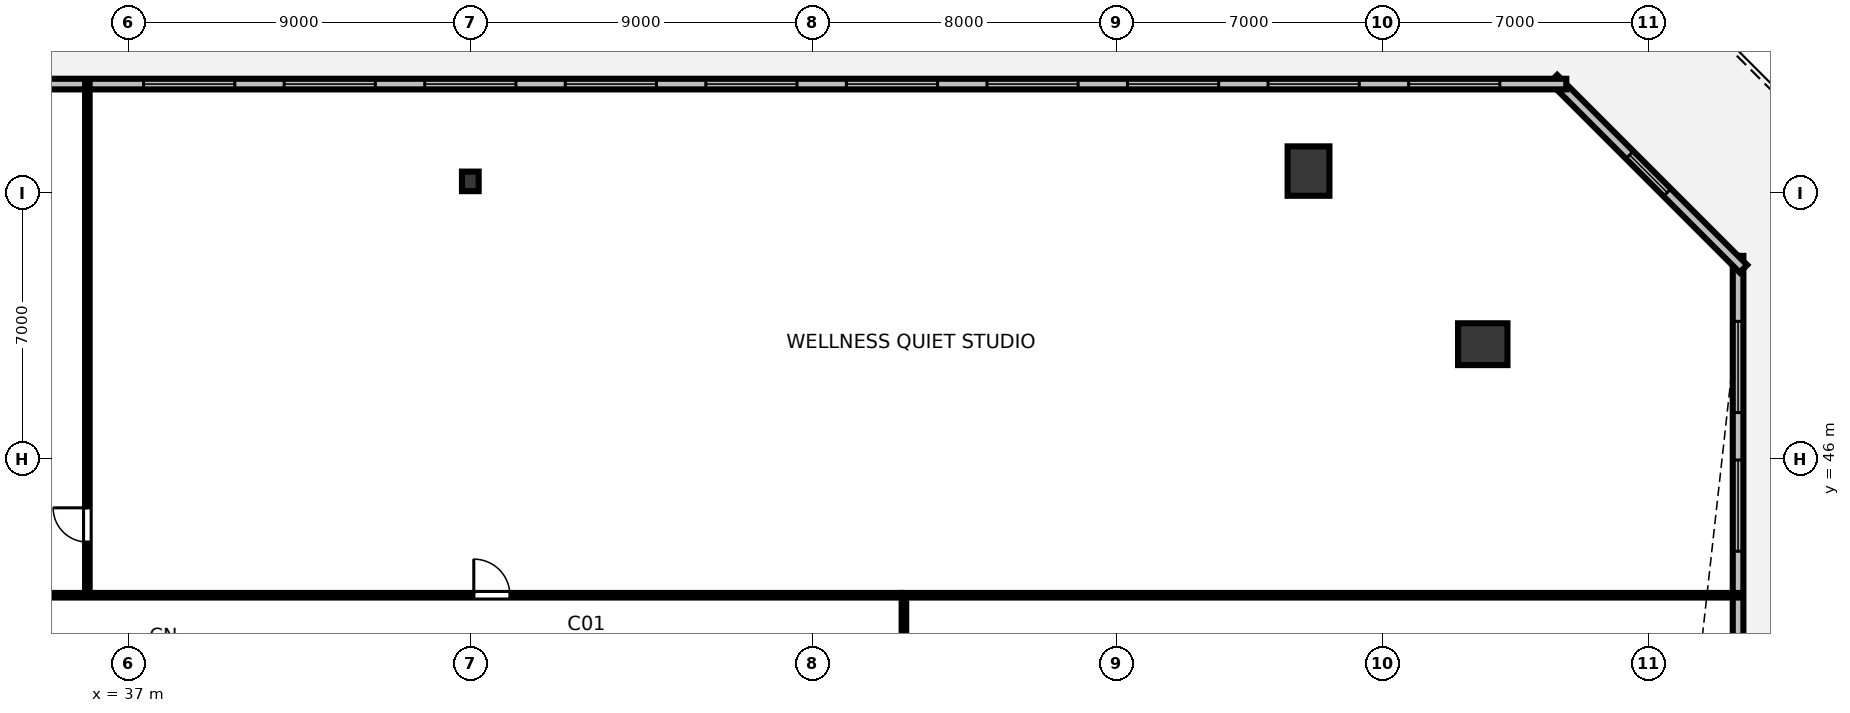
"""IFC4 building model, lengths in metres.
Left out: names, types, materials, properties, quantities, classifications, styles, units other than length and angle.
Written with IfcOpenShell. Run it as: python <this file> out.ifc"""

import sys

from ifc_helpers import new_model, si_unit, direction, frame, frame_2d, origin, origin_2d, place, context, subcontext, project, spatial, rectangle, hollow_rectangle, i_section, extrude, element, fill, save


model = new_model("IFC4")
c1 = context("Model", 3, precision=1e-05, world=origin(), true_north=direction((0.0, 1.0)))
c2 = subcontext(c1, "Body", "Model", "MODEL_VIEW")
j1 = project(units=[si_unit("LENGTHUNIT", "METRE"), si_unit("PLANEANGLEUNIT", "RADIAN")], contexts=[c1])
p1 = place(None, origin())
s1 = spatial("IfcSite", under=j1, at=p1, CompositionType="ELEMENT")
p2 = place(p1, origin())
s2 = spatial("IfcBuilding", under=s1, at=p2, CompositionType="ELEMENT")
p3 = place(p2, frame((0.0, 0.0, 14.0)))
s3 = spatial("IfcBuildingStorey", under=s2, at=p3, CompositionType="ELEMENT", Elevation=14.0)
for number, where, z_axis, x_axis in (
    (1, (72.642, 49.016, 0.0), (0.0, 0.0, 1.0), (0.0, 1.0, 0.0)),
    (2, (68.057, 53.571, 0.0), (0.0, 0.0, 1.0), (1.0, 0.0, 0.0)),
):
    element("IfcColumn", number, at=place(p3, frame(where, z_axis=z_axis, x_axis=x_axis)), inside=s3, PredefinedType="COLUMN", context=c2, shape_type="SweptSolid", body=[
        extrude(hollow_rectangle(XDim=1.1, YDim=1.3, WallThickness=0.07, at=origin_2d()), origin(), (0.0, 0.0, 1.0), 4.208),
    ])
p4 = place(p3, frame((46.0, 53.3, 0.0), z_axis=(0.0, 0.0, 1.0), x_axis=(1.0, 0.0, 0.0)))
e3 = element("IfcColumn", 3, at=p4, inside=s3, PredefinedType="COLUMN", context=c2, shape_type="SweptSolid", body=[
    extrude(i_section(OverallWidth=0.439, OverallDepth=0.514, WebThickness=0.06, FlangeThickness=0.097, FilletRadius=0.025, at=origin_2d()), origin(), (0.0, 0.0, 1.0), 4.208),
])
p5 = place(p3, frame((79.36, 12.66, 0.0), z_axis=(0.0, 0.0, 1.0), x_axis=(0.0, 1.0, 0.0)))
e4 = element("IfcWall", 4, at=p5, inside=s3, PredefinedType="STANDARD", context=c2, shape_type="SweptSolid", body=[
    extrude(rectangle(XDim=38.68, YDim=0.28, at=frame_2d((19.34, 0.0))), origin(), (0.0, 0.0, 1.0), 4.21),
])
p6 = place(p5, frame((23.74, 0.0, 0.0)))
e5 = element("IfcOpeningElement", 5, at=p6, cuts=e4, PredefinedType="OPENING", context=c2, shape_type="SweptSolid", body=[
    extrude(rectangle(XDim=1.6, YDim=2.15, at=frame_2d((0.8, 1.075))), frame((0.0, 0.15, 0.0), z_axis=(0.0, -1.0, 0.0), x_axis=(1.0, 0.0, 0.0)), (0.0, 0.0, 1.0), 0.3),
])
p7 = place(p5, frame((1.724, 0.0, 0.85)))
e6 = element("IfcOpeningElement", 6, at=p7, cuts=e4, PredefinedType="OPENING", context=c2, shape_type="SweptSolid", body=[
    extrude(rectangle(XDim=2.4, YDim=2.4, at=frame_2d((1.2, 1.2))), frame((0.0, 0.15, 0.0), z_axis=(0.0, -1.0, 0.0), x_axis=(1.0, 0.0, 0.0)), (0.0, 0.0, 1.0), 0.3),
])
p8 = place(p5, frame((5.372, 0.0, 0.85)))
e7 = element("IfcOpeningElement", 7, at=p8, cuts=e4, PredefinedType="OPENING", context=c2, shape_type="SweptSolid", body=[
    extrude(rectangle(XDim=2.4, YDim=2.4, at=frame_2d((1.2, 1.2))), frame((0.0, 0.15, 0.0), z_axis=(0.0, -1.0, 0.0), x_axis=(1.0, 0.0, 0.0)), (0.0, 0.0, 1.0), 0.3),
])
p9 = place(p5, frame((16.316, 0.0, 0.85)))
e8 = element("IfcOpeningElement", 8, at=p9, cuts=e4, PredefinedType="OPENING", context=c2, shape_type="SweptSolid", body=[
    extrude(rectangle(XDim=2.4, YDim=2.4, at=frame_2d((1.2, 1.2))), frame((0.0, 0.15, 0.0), z_axis=(0.0, -1.0, 0.0), x_axis=(1.0, 0.0, 0.0)), (0.0, 0.0, 1.0), 0.3),
])
p10 = place(p5, frame((19.964, 0.0, 0.85)))
e9 = element("IfcOpeningElement", 9, at=p10, cuts=e4, PredefinedType="OPENING", context=c2, shape_type="SweptSolid", body=[
    extrude(rectangle(XDim=2.4, YDim=2.4, at=frame_2d((1.2, 1.2))), frame((0.0, 0.15, 0.0), z_axis=(0.0, -1.0, 0.0), x_axis=(1.0, 0.0, 0.0)), (0.0, 0.0, 1.0), 0.3),
])
p11 = place(p5, frame((30.908, 0.0, 0.85)))
e10 = element("IfcOpeningElement", 10, at=p11, cuts=e4, PredefinedType="OPENING", context=c2, shape_type="SweptSolid", body=[
    extrude(rectangle(XDim=2.4, YDim=2.4, at=frame_2d((1.2, 1.2))), frame((0.0, 0.15, 0.0), z_axis=(0.0, -1.0, 0.0), x_axis=(1.0, 0.0, 0.0)), (0.0, 0.0, 1.0), 0.3),
])
p12 = place(p5, frame((34.556, 0.0, 0.85)))
e11 = element("IfcOpeningElement", 11, at=p12, cuts=e4, PredefinedType="OPENING", context=c2, shape_type="SweptSolid", body=[
    extrude(rectangle(XDim=2.4, YDim=2.4, at=frame_2d((1.2, 1.2))), frame((0.0, 0.15, 0.0), z_axis=(0.0, -1.0, 0.0), x_axis=(1.0, 0.0, 0.0)), (0.0, 0.0, 1.0), 0.3),
])
p13 = place(p3, frame((79.5, 51.002, 0.0), z_axis=(0.0, 0.0, 1.0), x_axis=(-0.707106781187, 0.707106781187, 0.0)))
e12 = element("IfcWall", 12, at=p13, inside=s3, PredefinedType="STANDARD", context=c2, shape_type="SweptSolid", body=[
    extrude(rectangle(XDim=7.068, YDim=0.28, at=frame_2d((3.534, 0.0))), origin(), (0.0, 0.0, 1.0), 4.21),
])
p14 = place(p13, frame((2.834, 0.0, 1.5)))
e13 = element("IfcOpeningElement", 13, at=p14, cuts=e12, PredefinedType="OPENING", context=c2, shape_type="SweptSolid", body=[
    extrude(rectangle(XDim=1.4, YDim=1.2, at=frame_2d((0.7, 0.6))), frame((0.0, 0.15, 0.0), z_axis=(0.0, -1.0, 0.0), x_axis=(1.0, 0.0, 0.0)), (0.0, 0.0, 1.0), 0.3),
])
p15 = place(p3, frame((74.84, 55.86, 0.0), z_axis=(0.0, 0.0, 1.0), x_axis=(-1.0, 0.0, 0.0)))
e14 = element("IfcWall", 14, at=p15, inside=s3, PredefinedType="STANDARD", context=c2, shape_type="SweptSolid", body=[
    extrude(rectangle(XDim=57.68, YDim=0.28, at=frame_2d((28.84, 0.0))), origin(), (0.0, 0.0, 1.0), 4.21),
])
p16 = place(p15, frame((1.749, 0.0, 0.85)))
e15 = element("IfcOpeningElement", 15, at=p16, cuts=e14, PredefinedType="OPENING", context=c2, shape_type="SweptSolid", body=[
    extrude(rectangle(XDim=2.4, YDim=2.4, at=frame_2d((1.2, 1.2))), frame((0.0, 0.15, 0.0), z_axis=(0.0, -1.0, 0.0), x_axis=(1.0, 0.0, 0.0)), (0.0, 0.0, 1.0), 0.3),
])
p17 = place(p15, frame((5.448, 0.0, 0.85)))
e16 = element("IfcOpeningElement", 16, at=p17, cuts=e14, PredefinedType="OPENING", context=c2, shape_type="SweptSolid", body=[
    extrude(rectangle(XDim=2.4, YDim=2.4, at=frame_2d((1.2, 1.2))), frame((0.0, 0.15, 0.0), z_axis=(0.0, -1.0, 0.0), x_axis=(1.0, 0.0, 0.0)), (0.0, 0.0, 1.0), 0.3),
])
p18 = place(p15, frame((9.147, 0.0, 0.85)))
e17 = element("IfcOpeningElement", 17, at=p18, cuts=e14, PredefinedType="OPENING", context=c2, shape_type="SweptSolid", body=[
    extrude(rectangle(XDim=2.4, YDim=2.4, at=frame_2d((1.2, 1.2))), frame((0.0, 0.15, 0.0), z_axis=(0.0, -1.0, 0.0), x_axis=(1.0, 0.0, 0.0)), (0.0, 0.0, 1.0), 0.3),
])
p19 = place(p15, frame((12.845, 0.0, 0.85)))
e18 = element("IfcOpeningElement", 18, at=p19, cuts=e14, PredefinedType="OPENING", context=c2, shape_type="SweptSolid", body=[
    extrude(rectangle(XDim=2.4, YDim=2.4, at=frame_2d((1.2, 1.2))), frame((0.0, 0.15, 0.0), z_axis=(0.0, -1.0, 0.0), x_axis=(1.0, 0.0, 0.0)), (0.0, 0.0, 1.0), 0.3),
])
p20 = place(p15, frame((16.544, 0.0, 0.85)))
e19 = element("IfcOpeningElement", 19, at=p20, cuts=e14, PredefinedType="OPENING", context=c2, shape_type="SweptSolid", body=[
    extrude(rectangle(XDim=2.4, YDim=2.4, at=frame_2d((1.2, 1.2))), frame((0.0, 0.15, 0.0), z_axis=(0.0, -1.0, 0.0), x_axis=(1.0, 0.0, 0.0)), (0.0, 0.0, 1.0), 0.3),
])
p21 = place(p15, frame((20.243, 0.0, 0.85)))
e20 = element("IfcOpeningElement", 20, at=p21, cuts=e14, PredefinedType="OPENING", context=c2, shape_type="SweptSolid", body=[
    extrude(rectangle(XDim=2.4, YDim=2.4, at=frame_2d((1.2, 1.2))), frame((0.0, 0.15, 0.0), z_axis=(0.0, -1.0, 0.0), x_axis=(1.0, 0.0, 0.0)), (0.0, 0.0, 1.0), 0.3),
])
p22 = place(p15, frame((23.941, 0.0, 0.85)))
e21 = element("IfcOpeningElement", 21, at=p22, cuts=e14, PredefinedType="OPENING", context=c2, shape_type="SweptSolid", body=[
    extrude(rectangle(XDim=2.4, YDim=2.4, at=frame_2d((1.2, 1.2))), frame((0.0, 0.15, 0.0), z_axis=(0.0, -1.0, 0.0), x_axis=(1.0, 0.0, 0.0)), (0.0, 0.0, 1.0), 0.3),
])
p23 = place(p15, frame((27.64, 0.0, 0.85)))
e22 = element("IfcOpeningElement", 22, at=p23, cuts=e14, PredefinedType="OPENING", context=c2, shape_type="SweptSolid", body=[
    extrude(rectangle(XDim=2.4, YDim=2.4, at=frame_2d((1.2, 1.2))), frame((0.0, 0.15, 0.0), z_axis=(0.0, -1.0, 0.0), x_axis=(1.0, 0.0, 0.0)), (0.0, 0.0, 1.0), 0.3),
])
p24 = place(p15, frame((31.339, 0.0, 0.85)))
e23 = element("IfcOpeningElement", 23, at=p24, cuts=e14, PredefinedType="OPENING", context=c2, shape_type="SweptSolid", body=[
    extrude(rectangle(XDim=2.4, YDim=2.4, at=frame_2d((1.2, 1.2))), frame((0.0, 0.15, 0.0), z_axis=(0.0, -1.0, 0.0), x_axis=(1.0, 0.0, 0.0)), (0.0, 0.0, 1.0), 0.3),
])
p25 = place(p15, frame((35.037, 0.0, 0.85)))
e24 = element("IfcOpeningElement", 24, at=p25, cuts=e14, PredefinedType="OPENING", context=c2, shape_type="SweptSolid", body=[
    extrude(rectangle(XDim=2.4, YDim=2.4, at=frame_2d((1.2, 1.2))), frame((0.0, 0.15, 0.0), z_axis=(0.0, -1.0, 0.0), x_axis=(1.0, 0.0, 0.0)), (0.0, 0.0, 1.0), 0.3),
])
p26 = place(p15, frame((42.435, 0.0, 0.85)))
e25 = element("IfcOpeningElement", 25, at=p26, cuts=e14, PredefinedType="OPENING", context=c2, shape_type="SweptSolid", body=[
    extrude(rectangle(XDim=2.4, YDim=2.4, at=frame_2d((1.2, 1.2))), frame((0.0, 0.15, 0.0), z_axis=(0.0, -1.0, 0.0), x_axis=(1.0, 0.0, 0.0)), (0.0, 0.0, 1.0), 0.3),
])
p27 = place(p15, frame((46.133, 0.0, 0.85)))
e26 = element("IfcOpeningElement", 26, at=p27, cuts=e14, PredefinedType="OPENING", context=c2, shape_type="SweptSolid", body=[
    extrude(rectangle(XDim=2.4, YDim=2.4, at=frame_2d((1.2, 1.2))), frame((0.0, 0.15, 0.0), z_axis=(0.0, -1.0, 0.0), x_axis=(1.0, 0.0, 0.0)), (0.0, 0.0, 1.0), 0.3),
])
p28 = place(p15, frame((49.832, 0.0, 0.85)))
e27 = element("IfcOpeningElement", 27, at=p28, cuts=e14, PredefinedType="OPENING", context=c2, shape_type="SweptSolid", body=[
    extrude(rectangle(XDim=2.4, YDim=2.4, at=frame_2d((1.2, 1.2))), frame((0.0, 0.15, 0.0), z_axis=(0.0, -1.0, 0.0), x_axis=(1.0, 0.0, 0.0)), (0.0, 0.0, 1.0), 0.3),
])
p29 = place(p15, frame((53.531, 0.0, 0.85)))
e28 = element("IfcOpeningElement", 28, at=p29, cuts=e14, PredefinedType="OPENING", context=c2, shape_type="SweptSolid", body=[
    extrude(rectangle(XDim=2.4, YDim=2.4, at=frame_2d((1.2, 1.2))), frame((0.0, 0.15, 0.0), z_axis=(0.0, -1.0, 0.0), x_axis=(1.0, 0.0, 0.0)), (0.0, 0.0, 1.0), 0.3),
])
p30 = place(p3, frame((35.923, 42.41, 0.0), z_axis=(0.0, 0.0, 1.0), x_axis=(0.0, 1.0, 0.0)))
e29 = element("IfcWall", 29, at=p30, inside=s3, PredefinedType="PARTITIONING", context=c2, shape_type="SweptSolid", body=[
    extrude(rectangle(XDim=13.45, YDim=0.12, at=frame_2d((6.725, 0.0))), origin(), (0.0, 0.0, 1.0), 3.31),
])
p31 = place(p30, frame((1.4, 0.0, 0.0)))
e30 = element("IfcOpeningElement", 30, at=p31, cuts=e29, PredefinedType="OPENING", context=c2, shape_type="SweptSolid", body=[
    extrude(rectangle(XDim=0.9, YDim=2.15, at=frame_2d((0.45, 1.075))), frame((0.0, 0.07, 0.0), z_axis=(0.0, -1.0, 0.0), x_axis=(1.0, 0.0, 0.0)), (0.0, 0.0, 1.0), 0.14),
])
p32 = place(p3, frame((34.65, 42.41, 0.0), z_axis=(0.0, 0.0, 1.0), x_axis=(1.0, 0.0, 0.0)))
e31 = element("IfcWall", 31, at=p32, inside=s3, PredefinedType="PARTITIONING", context=c2, shape_type="SweptSolid", body=[
    extrude(rectangle(XDim=22.7, YDim=0.12, at=frame_2d((11.35, 0.0))), origin(), (0.0, 0.0, 1.0), 3.31),
])
p33 = place(p32, frame((11.441, 0.0, 0.0)))
e32 = element("IfcOpeningElement", 32, at=p33, cuts=e31, PredefinedType="OPENING", context=c2, shape_type="SweptSolid", body=[
    extrude(rectangle(XDim=0.95, YDim=2.15, at=frame_2d((0.475, 1.075))), frame((0.0, 0.07, 0.0), z_axis=(0.0, -1.0, 0.0), x_axis=(1.0, 0.0, 0.0)), (0.0, 0.0, 1.0), 0.14),
])
p34 = place(p3, frame((57.41, 21.65, 0.0), z_axis=(0.0, 0.0, 1.0), x_axis=(0.0, 1.0, 0.0)))
e33 = element("IfcWall", 33, at=p34, inside=s3, PredefinedType="PARTITIONING", context=c2, shape_type="SweptSolid", body=[
    extrude(rectangle(XDim=20.7, YDim=0.12, at=frame_2d((10.35, 0.0))), origin(), (0.0, 0.0, 1.0), 3.31),
])
p35 = place(p34, frame((2.226, 0.0, 0.0)))
e34 = element("IfcOpeningElement", 34, at=p35, cuts=e33, PredefinedType="OPENING", context=c2, shape_type="SweptSolid", body=[
    extrude(rectangle(XDim=0.95, YDim=2.15, at=frame_2d((0.475, 1.075))), frame((0.0, 0.07, 0.0), z_axis=(0.0, -1.0, 0.0), x_axis=(1.0, 0.0, 0.0)), (0.0, 0.0, 1.0), 0.14),
])
p36 = place(p34, frame((8.954, 0.0, 0.0)))
e35 = element("IfcOpeningElement", 35, at=p36, cuts=e33, PredefinedType="OPENING", context=c2, shape_type="SweptSolid", body=[
    extrude(rectangle(XDim=0.95, YDim=2.15, at=frame_2d((0.475, 1.075))), frame((0.0, 0.07, 0.0), z_axis=(0.0, -1.0, 0.0), x_axis=(1.0, 0.0, 0.0)), (0.0, 0.0, 1.0), 0.14),
])
p37 = place(p34, frame((16.603, 0.0, 0.0)))
e36 = element("IfcOpeningElement", 36, at=p37, cuts=e33, PredefinedType="OPENING", context=c2, shape_type="SweptSolid", body=[
    extrude(rectangle(XDim=0.95, YDim=2.15, at=frame_2d((0.475, 1.075))), frame((0.0, 0.07, 0.0), z_axis=(0.0, -1.0, 0.0), x_axis=(1.0, 0.0, 0.0)), (0.0, 0.0, 1.0), 0.14),
])
p38 = place(p3, frame((57.35, 42.41, 0.0), z_axis=(0.0, 0.0, 1.0), x_axis=(1.0, 0.0, 0.0)))
e37 = element("IfcWall", 37, at=p38, inside=s3, PredefinedType="PARTITIONING", context=c2, shape_type="SweptSolid", body=[
    extrude(rectangle(XDim=22.01, YDim=0.12, at=frame_2d((11.005, 0.0))), origin(), (0.0, 0.0, 1.0), 3.31),
])
p39 = place(p11, origin())
e38 = element("IfcWindow", 38, at=p39, inside=s3, PartitioningType="SINGLE_PANEL", PredefinedType="WINDOW", context=c2, shape_type="SweptSolid", body=[
    extrude(rectangle(XDim=2.4, YDim=2.4, at=frame_2d((1.2, 1.2))), frame((0.0, 0.03, 0.0), z_axis=(0.0, -1.0, 0.0), x_axis=(1.0, 0.0, 0.0)), (0.0, 0.0, 1.0), 0.06),
])
fill(e10, e38)
p40 = place(p12, origin())
e39 = element("IfcWindow", 39, at=p40, inside=s3, PartitioningType="SINGLE_PANEL", PredefinedType="WINDOW", context=c2, shape_type="SweptSolid", body=[
    extrude(rectangle(XDim=2.4, YDim=2.4, at=frame_2d((1.2, 1.2))), frame((0.0, 0.03, 0.0), z_axis=(0.0, -1.0, 0.0), x_axis=(1.0, 0.0, 0.0)), (0.0, 0.0, 1.0), 0.06),
])
fill(e11, e39)
p41 = place(p14, origin())
e40 = element("IfcWindow", 40, at=p41, inside=s3, PartitioningType="SINGLE_PANEL", PredefinedType="WINDOW", context=c2, shape_type="SweptSolid", body=[
    extrude(rectangle(XDim=1.4, YDim=1.2, at=frame_2d((0.7, 0.6))), frame((0.0, 0.03, 0.0), z_axis=(0.0, -1.0, 0.0), x_axis=(1.0, 0.0, 0.0)), (0.0, 0.0, 1.0), 0.06),
])
fill(e13, e40)
p42 = place(p16, origin())
e41 = element("IfcWindow", 41, at=p42, inside=s3, PartitioningType="SINGLE_PANEL", PredefinedType="WINDOW", context=c2, shape_type="SweptSolid", body=[
    extrude(rectangle(XDim=2.4, YDim=2.4, at=frame_2d((1.2, 1.2))), frame((0.0, 0.03, 0.0), z_axis=(0.0, -1.0, 0.0), x_axis=(1.0, 0.0, 0.0)), (0.0, 0.0, 1.0), 0.06),
])
fill(e15, e41)
p43 = place(p17, origin())
e42 = element("IfcWindow", 42, at=p43, inside=s3, PartitioningType="SINGLE_PANEL", PredefinedType="WINDOW", context=c2, shape_type="SweptSolid", body=[
    extrude(rectangle(XDim=2.4, YDim=2.4, at=frame_2d((1.2, 1.2))), frame((0.0, 0.03, 0.0), z_axis=(0.0, -1.0, 0.0), x_axis=(1.0, 0.0, 0.0)), (0.0, 0.0, 1.0), 0.06),
])
fill(e16, e42)
p44 = place(p18, origin())
e43 = element("IfcWindow", 43, at=p44, inside=s3, PartitioningType="SINGLE_PANEL", PredefinedType="WINDOW", context=c2, shape_type="SweptSolid", body=[
    extrude(rectangle(XDim=2.4, YDim=2.4, at=frame_2d((1.2, 1.2))), frame((0.0, 0.03, 0.0), z_axis=(0.0, -1.0, 0.0), x_axis=(1.0, 0.0, 0.0)), (0.0, 0.0, 1.0), 0.06),
])
fill(e17, e43)
p45 = place(p19, origin())
e44 = element("IfcWindow", 44, at=p45, inside=s3, PartitioningType="SINGLE_PANEL", PredefinedType="WINDOW", context=c2, shape_type="SweptSolid", body=[
    extrude(rectangle(XDim=2.4, YDim=2.4, at=frame_2d((1.2, 1.2))), frame((0.0, 0.03, 0.0), z_axis=(0.0, -1.0, 0.0), x_axis=(1.0, 0.0, 0.0)), (0.0, 0.0, 1.0), 0.06),
])
fill(e18, e44)
p46 = place(p20, origin())
e45 = element("IfcWindow", 45, at=p46, inside=s3, PartitioningType="SINGLE_PANEL", PredefinedType="WINDOW", context=c2, shape_type="SweptSolid", body=[
    extrude(rectangle(XDim=2.4, YDim=2.4, at=frame_2d((1.2, 1.2))), frame((0.0, 0.03, 0.0), z_axis=(0.0, -1.0, 0.0), x_axis=(1.0, 0.0, 0.0)), (0.0, 0.0, 1.0), 0.06),
])
fill(e19, e45)
p47 = place(p21, origin())
e46 = element("IfcWindow", 46, at=p47, inside=s3, PartitioningType="SINGLE_PANEL", PredefinedType="WINDOW", context=c2, shape_type="SweptSolid", body=[
    extrude(rectangle(XDim=2.4, YDim=2.4, at=frame_2d((1.2, 1.2))), frame((0.0, 0.03, 0.0), z_axis=(0.0, -1.0, 0.0), x_axis=(1.0, 0.0, 0.0)), (0.0, 0.0, 1.0), 0.06),
])
fill(e20, e46)
p48 = place(p22, origin())
e47 = element("IfcWindow", 47, at=p48, inside=s3, PartitioningType="SINGLE_PANEL", PredefinedType="WINDOW", context=c2, shape_type="SweptSolid", body=[
    extrude(rectangle(XDim=2.4, YDim=2.4, at=frame_2d((1.2, 1.2))), frame((0.0, 0.03, 0.0), z_axis=(0.0, -1.0, 0.0), x_axis=(1.0, 0.0, 0.0)), (0.0, 0.0, 1.0), 0.06),
])
fill(e21, e47)
p49 = place(p23, origin())
e48 = element("IfcWindow", 48, at=p49, inside=s3, PartitioningType="SINGLE_PANEL", PredefinedType="WINDOW", context=c2, shape_type="SweptSolid", body=[
    extrude(rectangle(XDim=2.4, YDim=2.4, at=frame_2d((1.2, 1.2))), frame((0.0, 0.03, 0.0), z_axis=(0.0, -1.0, 0.0), x_axis=(1.0, 0.0, 0.0)), (0.0, 0.0, 1.0), 0.06),
])
fill(e22, e48)
p50 = place(p24, origin())
e49 = element("IfcWindow", 49, at=p50, inside=s3, PartitioningType="SINGLE_PANEL", PredefinedType="WINDOW", context=c2, shape_type="SweptSolid", body=[
    extrude(rectangle(XDim=2.4, YDim=2.4, at=frame_2d((1.2, 1.2))), frame((0.0, 0.03, 0.0), z_axis=(0.0, -1.0, 0.0), x_axis=(1.0, 0.0, 0.0)), (0.0, 0.0, 1.0), 0.06),
])
fill(e23, e49)
p51 = place(p25, origin())
e50 = element("IfcWindow", 50, at=p51, inside=s3, PartitioningType="SINGLE_PANEL", PredefinedType="WINDOW", context=c2, shape_type="SweptSolid", body=[
    extrude(rectangle(XDim=2.4, YDim=2.4, at=frame_2d((1.2, 1.2))), frame((0.0, 0.03, 0.0), z_axis=(0.0, -1.0, 0.0), x_axis=(1.0, 0.0, 0.0)), (0.0, 0.0, 1.0), 0.06),
])
fill(e24, e50)
p52 = place(p31, origin())
e51 = element("IfcDoor", 51, at=p52, inside=s3, OperationType="SINGLE_SWING_RIGHT", PredefinedType="DOOR", context=c2, shape_type="SweptSolid", body=[
    extrude(rectangle(XDim=0.9, YDim=2.15, at=frame_2d((0.45, 1.075))), frame((0.0, 0.025, 0.0), z_axis=(0.0, -1.0, 0.0), x_axis=(1.0, 0.0, 0.0)), (0.0, 0.0, 1.0), 0.05),
])
fill(e30, e51)
p53 = place(p33, origin())
e52 = element("IfcDoor", 52, at=p53, inside=s3, OperationType="SINGLE_SWING_LEFT", PredefinedType="DOOR", context=c2, shape_type="SweptSolid", body=[
    extrude(rectangle(XDim=0.95, YDim=2.15, at=frame_2d((0.475, 1.075))), frame((0.0, 0.025, 0.0), z_axis=(0.0, -1.0, 0.0), x_axis=(1.0, 0.0, 0.0)), (0.0, 0.0, 1.0), 0.05),
])
fill(e32, e52)
save(model, sys.argv[1])
